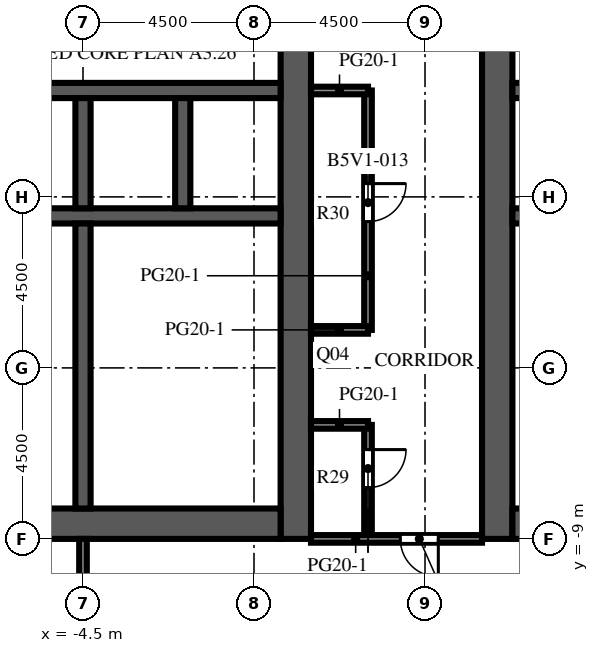
"""IFC4 building model, lengths in metres.
Left out: names, types, materials, properties, quantities, classifications, styles, units other than length and angle.
Written with IfcOpenShell. Run it as: python <this file> out.ifc"""

import sys

from ifc_helpers import new_model, si_unit, direction, frame, frame_2d, origin, place, context, subcontext, project, spatial, rectangle, extrude, element, fill, save


model = new_model("IFC4")
c1 = context("Model", 3, precision=1e-05, world=origin(), true_north=direction((0.0, 1.0)))
c2 = subcontext(c1, "Body", "Model", "MODEL_VIEW")
j1 = project(units=[si_unit("LENGTHUNIT", "METRE"), si_unit("PLANEANGLEUNIT", "RADIAN")], contexts=[c1])
p1 = place(None, origin())
s1 = spatial("IfcSite", under=j1, at=p1, CompositionType="ELEMENT")
p2 = place(p1, origin())
s2 = spatial("IfcBuilding", under=s1, at=p2, CompositionType="ELEMENT")
p3 = place(p2, frame((0.0, 0.0, 165.0)))
s3 = spatial("IfcBuildingStorey", under=s2, at=p3, CompositionType="ELEMENT", Elevation=165.0)
p4 = place(p3, frame((1.1, -9.0, 0.0), z_axis=(0.0, 0.0, 1.0), x_axis=(0.0, 1.0, 0.0)))
e1 = element("IfcWall", 1, at=p4, inside=s3, PredefinedType="SHEAR", context=c2, shape_type="SweptSolid", body=[
    extrude(rectangle(XDim=27.5, YDim=0.8, at=frame_2d((13.75, 0.0))), origin(), (0.0, 0.0, 1.0), 4.1),
])
p5 = place(p4, frame((12.55, 0.0, 0.0)))
e2 = element("IfcOpeningElement", 2, at=p5, cuts=e1, PredefinedType="OPENING", context=c2, shape_type="SweptSolid", body=[
    extrude(rectangle(XDim=2.4, YDim=2.4, at=frame_2d((1.2, 1.2))), frame((0.0, 0.41, 0.0), z_axis=(0.0, -1.0, 0.0), x_axis=(1.0, 0.0, 0.0)), (0.0, 0.0, 1.0), 0.82),
])
p6 = place(p4, frame((3.95, 0.0, 0.0)))
e3 = element("IfcOpeningElement", 3, at=p6, cuts=e1, PredefinedType="OPENING", context=c2, shape_type="SweptSolid", body=[
    extrude(rectangle(XDim=1.2, YDim=2.1, at=frame_2d((0.6, 1.05))), frame((0.0, 0.41, 0.0), z_axis=(0.0, -1.0, 0.0), x_axis=(1.0, 0.0, 0.0)), (0.0, 0.0, 1.0), 0.82),
])
p7 = place(p4, frame((22.35, 0.0, 0.0)))
e4 = element("IfcOpeningElement", 4, at=p7, cuts=e1, PredefinedType="OPENING", context=c2, shape_type="SweptSolid", body=[
    extrude(rectangle(XDim=1.2, YDim=2.1, at=frame_2d((0.6, 1.05))), frame((0.0, 0.41, 0.0), z_axis=(0.0, -1.0, 0.0), x_axis=(1.0, 0.0, 0.0)), (0.0, 0.0, 1.0), 0.82),
])
p8 = place(p3, frame((-9.7, -8.6, 0.0), z_axis=(0.0, 0.0, 1.0), x_axis=(1.0, 0.0, 0.0)))
e5 = element("IfcWall", 5, at=p8, inside=s3, PredefinedType="SHEAR", context=c2, shape_type="SweptSolid", body=[
    extrude(rectangle(XDim=10.4, YDim=0.8, at=frame_2d((5.2, 0.0))), origin(), (0.0, 0.0, 1.0), 4.1),
])
p9 = place(p3, frame((-9.7, -0.5, 0.0), z_axis=(0.0, 0.0, 1.0), x_axis=(1.0, 0.0, 0.0)))
e6 = element("IfcWall", 6, at=p9, inside=s3, PredefinedType="SHEAR", context=c2, shape_type="SweptSolid", body=[
    extrude(rectangle(XDim=10.4, YDim=0.4, at=frame_2d((5.2, 0.0))), origin(), (0.0, 0.0, 1.0), 4.1),
])
p10 = place(p3, frame((-9.7, 2.8, 0.0), z_axis=(0.0, 0.0, 1.0), x_axis=(1.0, 0.0, 0.0)))
e7 = element("IfcWall", 7, at=p10, inside=s3, PredefinedType="SHEAR", context=c2, shape_type="SweptSolid", body=[
    extrude(rectangle(XDim=10.4, YDim=0.4, at=frame_2d((5.2, 0.0))), origin(), (0.0, 0.0, 1.0), 4.1),
])
p11 = place(p10, frame((0.738, 0.0, 0.0)))
e8 = element("IfcOpeningElement", 8, at=p11, cuts=e7, PredefinedType="OPENING", context=c2, shape_type="SweptSolid", body=[
    extrude(rectangle(XDim=1.1, YDim=2.1, at=frame_2d((0.55, 1.05))), frame((0.0, 0.21, 0.0), z_axis=(0.0, -1.0, 0.0), x_axis=(1.0, 0.0, 0.0)), (0.0, 0.0, 1.0), 0.42),
])
p12 = place(p10, frame((3.337, 0.0, 0.0)))
e9 = element("IfcOpeningElement", 9, at=p12, cuts=e7, PredefinedType="OPENING", context=c2, shape_type="SweptSolid", body=[
    extrude(rectangle(XDim=1.1, YDim=2.1, at=frame_2d((0.55, 1.05))), frame((0.0, 0.21, 0.0), z_axis=(0.0, -1.0, 0.0), x_axis=(1.0, 0.0, 0.0)), (0.0, 0.0, 1.0), 0.42),
])
p13 = place(p10, frame((6.012, 0.0, 0.0)))
e10 = element("IfcOpeningElement", 10, at=p13, cuts=e7, PredefinedType="OPENING", context=c2, shape_type="SweptSolid", body=[
    extrude(rectangle(XDim=1.0, YDim=2.1, at=frame_2d((0.5, 1.05))), frame((0.0, 0.21, 0.0), z_axis=(0.0, -1.0, 0.0), x_axis=(1.0, 0.0, 0.0)), (0.0, 0.0, 1.0), 0.42),
])
p14 = place(p10, frame((8.613, 0.0, 0.0)))
e11 = element("IfcOpeningElement", 11, at=p14, cuts=e7, PredefinedType="OPENING", context=c2, shape_type="SweptSolid", body=[
    extrude(rectangle(XDim=1.0, YDim=2.1, at=frame_2d((0.5, 1.05))), frame((0.0, 0.21, 0.0), z_axis=(0.0, -1.0, 0.0), x_axis=(1.0, 0.0, 0.0)), (0.0, 0.0, 1.0), 0.42),
])
for number, where, z_axis, x_axis in (
    (12, (-4.5, -0.3, 0.0), (0.0, 0.0, 1.0), (0.0, 1.0, 0.0)),
    (13, (-1.875, -0.3, 0.0), (0.0, 0.0, 1.0), (0.0, 1.0, 0.0)),
):
    element("IfcWall", number, at=place(p3, frame(where, z_axis=z_axis, x_axis=x_axis)), inside=s3, PredefinedType="SHEAR", context=c2, shape_type="SweptSolid", body=[
        extrude(rectangle(XDim=2.9, YDim=0.4, at=frame_2d((1.45, 0.0))), origin(), (0.0, 0.0, 1.0), 4.1),
    ])
p15 = place(p3, frame((-4.5, -8.2, 0.0), z_axis=(0.0, 0.0, 1.0), x_axis=(0.0, 1.0, 0.0)))
e14 = element("IfcWall", 14, at=p15, inside=s3, PredefinedType="SHEAR", context=c2, shape_type="SweptSolid", body=[
    extrude(rectangle(XDim=7.5, YDim=0.4, at=frame_2d((3.75, 0.0))), origin(), (0.0, 0.0, 1.0), 4.1),
])
p16 = place(p3, frame((6.4, -9.0, 0.0), z_axis=(0.0, 0.0, 1.0), x_axis=(0.0, 1.0, 0.0)))
e15 = element("IfcWall", 15, at=p16, inside=s3, PredefinedType="SHEAR", context=c2, shape_type="SweptSolid", body=[
    extrude(rectangle(XDim=27.5, YDim=0.8, at=frame_2d((13.75, 0.0))), origin(), (0.0, 0.0, 1.0), 4.1),
])
p17 = place(p16, frame((12.55, 0.0, 0.0)))
e16 = element("IfcOpeningElement", 16, at=p17, cuts=e15, PredefinedType="OPENING", context=c2, shape_type="SweptSolid", body=[
    extrude(rectangle(XDim=2.4, YDim=2.4, at=frame_2d((1.2, 1.2))), frame((0.0, 0.41, 0.0), z_axis=(0.0, -1.0, 0.0), x_axis=(1.0, 0.0, 0.0)), (0.0, 0.0, 1.0), 0.82),
])
p18 = place(p16, frame((3.95, 0.0, 0.0)))
e17 = element("IfcOpeningElement", 17, at=p18, cuts=e15, PredefinedType="OPENING", context=c2, shape_type="SweptSolid", body=[
    extrude(rectangle(XDim=1.2, YDim=2.1, at=frame_2d((0.6, 1.05))), frame((0.0, 0.41, 0.0), z_axis=(0.0, -1.0, 0.0), x_axis=(1.0, 0.0, 0.0)), (0.0, 0.0, 1.0), 0.82),
])
p19 = place(p16, frame((22.35, 0.0, 0.0)))
e18 = element("IfcOpeningElement", 18, at=p19, cuts=e15, PredefinedType="OPENING", context=c2, shape_type="SweptSolid", body=[
    extrude(rectangle(XDim=1.2, YDim=2.1, at=frame_2d((0.6, 1.05))), frame((0.0, 0.41, 0.0), z_axis=(0.0, -1.0, 0.0), x_axis=(1.0, 0.0, 0.0)), (0.0, 0.0, 1.0), 0.82),
])
p20 = place(p3, frame((6.8, -8.6, 0.0), z_axis=(0.0, 0.0, 1.0), x_axis=(1.0, 0.0, 0.0)))
e19 = element("IfcWall", 19, at=p20, inside=s3, PredefinedType="SHEAR", context=c2, shape_type="SweptSolid", body=[
    extrude(rectangle(XDim=10.4, YDim=0.8, at=frame_2d((5.2, 0.0))), origin(), (0.0, 0.0, 1.0), 4.1),
])
p21 = place(p3, frame((6.8, -0.5, 0.0), z_axis=(0.0, 0.0, 1.0), x_axis=(1.0, 0.0, 0.0)))
e20 = element("IfcWall", 20, at=p21, inside=s3, PredefinedType="SHEAR", context=c2, shape_type="SweptSolid", body=[
    extrude(rectangle(XDim=10.4, YDim=0.4, at=frame_2d((5.2, 0.0))), origin(), (0.0, 0.0, 1.0), 4.1),
])
p22 = place(p3, frame((6.8, 2.8, 0.0), z_axis=(0.0, 0.0, 1.0), x_axis=(1.0, 0.0, 0.0)))
e21 = element("IfcWall", 21, at=p22, inside=s3, PredefinedType="SHEAR", context=c2, shape_type="SweptSolid", body=[
    extrude(rectangle(XDim=10.4, YDim=0.4, at=frame_2d((5.2, 0.0))), origin(), (0.0, 0.0, 1.0), 4.1),
])
p23 = place(p22, frame((0.738, 0.0, 0.0)))
e22 = element("IfcOpeningElement", 22, at=p23, cuts=e21, PredefinedType="OPENING", context=c2, shape_type="SweptSolid", body=[
    extrude(rectangle(XDim=1.1, YDim=2.1, at=frame_2d((0.55, 1.05))), frame((0.0, 0.21, 0.0), z_axis=(0.0, -1.0, 0.0), x_axis=(1.0, 0.0, 0.0)), (0.0, 0.0, 1.0), 0.42),
])
p24 = place(p22, frame((3.337, 0.0, 0.0)))
e23 = element("IfcOpeningElement", 23, at=p24, cuts=e21, PredefinedType="OPENING", context=c2, shape_type="SweptSolid", body=[
    extrude(rectangle(XDim=1.1, YDim=2.1, at=frame_2d((0.55, 1.05))), frame((0.0, 0.21, 0.0), z_axis=(0.0, -1.0, 0.0), x_axis=(1.0, 0.0, 0.0)), (0.0, 0.0, 1.0), 0.42),
])
p25 = place(p22, frame((6.012, 0.0, 0.0)))
e24 = element("IfcOpeningElement", 24, at=p25, cuts=e21, PredefinedType="OPENING", context=c2, shape_type="SweptSolid", body=[
    extrude(rectangle(XDim=1.0, YDim=2.1, at=frame_2d((0.5, 1.05))), frame((0.0, 0.21, 0.0), z_axis=(0.0, -1.0, 0.0), x_axis=(1.0, 0.0, 0.0)), (0.0, 0.0, 1.0), 0.42),
])
p26 = place(p22, frame((8.613, 0.0, 0.0)))
e25 = element("IfcOpeningElement", 25, at=p26, cuts=e21, PredefinedType="OPENING", context=c2, shape_type="SweptSolid", body=[
    extrude(rectangle(XDim=1.0, YDim=2.1, at=frame_2d((0.5, 1.05))), frame((0.0, 0.21, 0.0), z_axis=(0.0, -1.0, 0.0), x_axis=(1.0, 0.0, 0.0)), (0.0, 0.0, 1.0), 0.42),
])
p27 = place(p3, frame((-0.8, -8.2, 0.0), z_axis=(0.0, 0.0, 1.0), x_axis=(0.0, 1.0, 0.0)))
e26 = element("IfcWall", 26, at=p27, inside=s3, PredefinedType="PARTITIONING", context=c2, shape_type="SweptSolid", body=[
    extrude(rectangle(XDim=2.55, YDim=0.1, at=frame_2d((1.275, 0.0))), origin(), (0.0, 0.0, 1.0), 3.65),
])
p28 = place(p27, frame((0.775, 0.0, 0.0)))
e27 = element("IfcOpeningElement", 27, at=p28, cuts=e26, PredefinedType="OPENING", context=c2, shape_type="SweptSolid", body=[
    extrude(rectangle(XDim=1.0, YDim=2.1, at=frame_2d((0.5, 1.05))), frame((0.0, 0.06, 0.0), z_axis=(0.0, -1.0, 0.0), x_axis=(1.0, 0.0, 0.0)), (0.0, 0.0, 1.0), 0.12),
])
p29 = place(p3, frame((-0.8, -5.65, 0.0), z_axis=(0.0, 0.0, 1.0), x_axis=(0.0, 1.0, 0.0)))
e28 = element("IfcWall", 28, at=p29, inside=s3, PredefinedType="PARTITIONING", context=c2, shape_type="SweptSolid", body=[
    extrude(rectangle(XDim=2.1, YDim=0.1, at=frame_2d((1.05, 0.0))), origin(), (0.0, 0.0, 1.0), 3.65),
])
p30 = place(p29, frame((0.55, 0.0, 0.0)))
e29 = element("IfcOpeningElement", 29, at=p30, cuts=e28, PredefinedType="OPENING", context=c2, shape_type="SweptSolid", body=[
    extrude(rectangle(XDim=1.0, YDim=2.1, at=frame_2d((0.5, 1.05))), frame((0.0, 0.06, 0.0), z_axis=(0.0, -1.0, 0.0), x_axis=(1.0, 0.0, 0.0)), (0.0, 0.0, 1.0), 0.12),
])
p31 = place(p3, frame((-0.8, -3.55, 0.0), z_axis=(0.0, 0.0, 1.0), x_axis=(0.0, 1.0, 0.0)))
e30 = element("IfcWall", 30, at=p31, inside=s3, PredefinedType="PARTITIONING", context=c2, shape_type="SweptSolid", body=[
    extrude(rectangle(XDim=2.85, YDim=0.1, at=frame_2d((1.425, 0.0))), origin(), (0.0, 0.0, 1.0), 3.65),
])
p32 = place(p31, frame((0.925, 0.0, 0.0)))
e31 = element("IfcOpeningElement", 31, at=p32, cuts=e30, PredefinedType="OPENING", context=c2, shape_type="SweptSolid", body=[
    extrude(rectangle(XDim=1.0, YDim=2.1, at=frame_2d((0.5, 1.05))), frame((0.0, 0.06, 0.0), z_axis=(0.0, -1.0, 0.0), x_axis=(1.0, 0.0, 0.0)), (0.0, 0.0, 1.0), 0.12),
])
for number, where, z_axis, x_axis in (
    (32, (-4.3, -5.65, 0.0), (0.0, 0.0, 1.0), (1.0, 0.0, 0.0)),
    (33, (-4.3, -3.55, 0.0), (0.0, 0.0, 1.0), (1.0, 0.0, 0.0)),
):
    element("IfcWall", number, at=place(p3, frame(where, z_axis=z_axis, x_axis=x_axis)), inside=s3, PredefinedType="PARTITIONING", context=c2, shape_type="SweptSolid", body=[
        extrude(rectangle(XDim=3.5, YDim=0.1, at=frame_2d((1.75, 0.0))), origin(), (0.0, 0.0, 1.0), 3.65),
    ])
p33 = place(p3, frame((-4.5, -26.5, 0.0), z_axis=(0.0, 0.0, 1.0), x_axis=(0.0, 1.0, 0.0)))
e34 = element("IfcWall", 34, at=p33, inside=s3, PredefinedType="PARTITIONING", context=c2, shape_type="SweptSolid", body=[
    extrude(rectangle(XDim=17.5, YDim=0.2, at=frame_2d((8.75, 0.0))), origin(), (0.0, 0.0, 1.0), 3.65),
])
p34 = place(p3, frame((3.0, -9.0, 0.0), z_axis=(0.0, 0.0, 1.0), x_axis=(0.0, 1.0, 0.0)))
e35 = element("IfcWall", 35, at=p34, inside=s3, PredefinedType="PARTITIONING", context=c2, shape_type="SweptSolid", body=[
    extrude(rectangle(XDim=3.0, YDim=0.2, at=frame_2d((1.5, 0.0))), origin(), (0.0, 0.0, 1.0), 3.65),
])
p35 = place(p34, frame((1.35, 0.0, 0.0)))
e36 = element("IfcOpeningElement", 36, at=p35, cuts=e35, PredefinedType="OPENING", context=c2, shape_type="SweptSolid", body=[
    extrude(rectangle(XDim=1.0, YDim=2.1, at=frame_2d((0.5, 1.05))), frame((0.0, 0.11, 0.0), z_axis=(0.0, -1.0, 0.0), x_axis=(1.0, 0.0, 0.0)), (0.0, 0.0, 1.0), 0.22),
])
p36 = place(p3, frame((3.0, -3.5, 0.0), z_axis=(0.0, 0.0, 1.0), x_axis=(0.0, 1.0, 0.0)))
e37 = element("IfcWall", 37, at=p36, inside=s3, PredefinedType="PARTITIONING", context=c2, shape_type="SweptSolid", body=[
    extrude(rectangle(XDim=6.3, YDim=0.2, at=frame_2d((3.15, 0.0))), origin(), (0.0, 0.0, 1.0), 3.65),
])
p37 = place(p36, frame((2.85, 0.0, 0.0)))
e38 = element("IfcOpeningElement", 38, at=p37, cuts=e37, PredefinedType="OPENING", context=c2, shape_type="SweptSolid", body=[
    extrude(rectangle(XDim=1.0, YDim=2.1, at=frame_2d((0.5, 1.05))), frame((0.0, 0.11, 0.0), z_axis=(0.0, -1.0, 0.0), x_axis=(1.0, 0.0, 0.0)), (0.0, 0.0, 1.0), 0.22),
])
p38 = place(p3, frame((6.0, -9.0, 0.0), z_axis=(0.0, 0.0, 1.0), x_axis=(-1.0, 0.0, 0.0)))
e39 = element("IfcWall", 39, at=p38, inside=s3, PredefinedType="PARTITIONING", context=c2, shape_type="SweptSolid", body=[
    extrude(rectangle(XDim=4.5, YDim=0.2, at=frame_2d((2.25, 0.0))), origin(), (0.0, 0.0, 1.0), 3.65),
])
p39 = place(p38, frame((1.15, 0.0, 0.0)))
e40 = element("IfcOpeningElement", 40, at=p39, cuts=e39, PredefinedType="OPENING", context=c2, shape_type="SweptSolid", body=[
    extrude(rectangle(XDim=1.0, YDim=2.1, at=frame_2d((0.5, 1.05))), frame((0.0, 0.11, 0.0), z_axis=(0.0, -1.0, 0.0), x_axis=(1.0, 0.0, 0.0)), (0.0, 0.0, 1.0), 0.22),
])
for number, where, z_axis, x_axis in (
    (41, (1.5, -6.0, 0.0), (0.0, 0.0, 1.0), (1.0, 0.0, 0.0)),
    (42, (1.5, -3.5, 0.0), (0.0, 0.0, 1.0), (1.0, 0.0, 0.0)),
    (43, (1.5, 2.8, 0.0), (0.0, 0.0, 1.0), (1.0, 0.0, 0.0)),
):
    element("IfcWall", number, at=place(p3, frame(where, z_axis=z_axis, x_axis=x_axis)), inside=s3, PredefinedType="PARTITIONING", context=c2, shape_type="SweptSolid", body=[
        extrude(rectangle(XDim=1.5, YDim=0.2, at=frame_2d((0.75, 0.0))), origin(), (0.0, 0.0, 1.0), 3.65),
    ])
p40 = place(p12, origin())
e44 = element("IfcDoor", 44, at=p40, inside=s3, OperationType="DOUBLE_DOOR_SLIDING", PredefinedType="DOOR", context=c2, shape_type="SweptSolid", body=[
    extrude(rectangle(XDim=1.1, YDim=2.1, at=frame_2d((0.55, 1.05))), frame((0.0, 0.025, 0.0), z_axis=(0.0, -1.0, 0.0), x_axis=(1.0, 0.0, 0.0)), (0.0, 0.0, 1.0), 0.05),
])
fill(e9, e44)
p41 = place(p5, origin())
e45 = element("IfcDoor", 45, at=p41, inside=s3, OperationType="DOUBLE_DOOR_DOUBLE_SWING", PredefinedType="DOOR", context=c2, shape_type="SweptSolid", body=[
    extrude(rectangle(XDim=2.4, YDim=2.4, at=frame_2d((1.2, 1.2))), frame((0.0, 0.025, 0.0), z_axis=(0.0, -1.0, 0.0), x_axis=(1.0, 0.0, 0.0)), (0.0, 0.0, 1.0), 0.05),
])
fill(e2, e45)
p42 = place(p17, origin())
e46 = element("IfcDoor", 46, at=p42, inside=s3, OperationType="DOUBLE_DOOR_DOUBLE_SWING", PredefinedType="DOOR", context=c2, shape_type="SweptSolid", body=[
    extrude(rectangle(XDim=2.4, YDim=2.4, at=frame_2d((1.2, 1.2))), frame((0.0, 0.025, 0.0), z_axis=(0.0, -1.0, 0.0), x_axis=(1.0, 0.0, 0.0)), (0.0, 0.0, 1.0), 0.05),
])
fill(e16, e46)
p43 = place(p13, origin())
e47 = element("IfcDoor", 47, at=p43, inside=s3, OperationType="SINGLE_SWING_LEFT", PredefinedType="DOOR", context=c2, shape_type="SweptSolid", body=[
    extrude(rectangle(XDim=1.0, YDim=2.1, at=frame_2d((0.5, 1.05))), frame((0.0, 0.025, 0.0), z_axis=(0.0, -1.0, 0.0), x_axis=(1.0, 0.0, 0.0)), (0.0, 0.0, 1.0), 0.05),
])
fill(e10, e47)
p44 = place(p14, origin())
e48 = element("IfcDoor", 48, at=p44, inside=s3, OperationType="SINGLE_SWING_RIGHT", PredefinedType="DOOR", context=c2, shape_type="SweptSolid", body=[
    extrude(rectangle(XDim=1.0, YDim=2.1, at=frame_2d((0.5, 1.05))), frame((0.0, 0.025, 0.0), z_axis=(0.0, -1.0, 0.0), x_axis=(1.0, 0.0, 0.0)), (0.0, 0.0, 1.0), 0.05),
])
fill(e11, e48)
p45 = place(p6, origin())
e49 = element("IfcDoor", 49, at=p45, inside=s3, OperationType="SINGLE_SWING_LEFT", PredefinedType="DOOR", context=c2, shape_type="SweptSolid", body=[
    extrude(rectangle(XDim=1.2, YDim=2.1, at=frame_2d((0.6, 1.05))), frame((0.0, 0.375, 0.0), z_axis=(0.0, -1.0, 0.0), x_axis=(1.0, 0.0, 0.0)), (0.0, 0.0, 1.0), 0.05),
])
fill(e3, e49)
p46 = place(p28, origin())
e50 = element("IfcDoor", 50, at=p46, inside=s3, OperationType="SINGLE_SWING_RIGHT", PredefinedType="DOOR", context=c2, shape_type="SweptSolid", body=[
    extrude(rectangle(XDim=1.0, YDim=2.1, at=frame_2d((0.5, 1.05))), frame((0.0, 0.025, 0.0), z_axis=(0.0, -1.0, 0.0), x_axis=(1.0, 0.0, 0.0)), (0.0, 0.0, 1.0), 0.05),
])
fill(e27, e50)
p47 = place(p30, origin())
e51 = element("IfcDoor", 51, at=p47, inside=s3, OperationType="SINGLE_SWING_LEFT", PredefinedType="DOOR", context=c2, shape_type="SweptSolid", body=[
    extrude(rectangle(XDim=1.0, YDim=2.1, at=frame_2d((0.5, 1.05))), frame((0.0, 0.025, 0.0), z_axis=(0.0, -1.0, 0.0), x_axis=(1.0, 0.0, 0.0)), (0.0, 0.0, 1.0), 0.05),
])
fill(e29, e51)
p48 = place(p32, origin())
e52 = element("IfcDoor", 52, at=p48, inside=s3, OperationType="SINGLE_SWING_RIGHT", PredefinedType="DOOR", context=c2, shape_type="SweptSolid", body=[
    extrude(rectangle(XDim=1.0, YDim=2.1, at=frame_2d((0.5, 1.05))), frame((0.0, 0.025, 0.0), z_axis=(0.0, -1.0, 0.0), x_axis=(1.0, 0.0, 0.0)), (0.0, 0.0, 1.0), 0.05),
])
fill(e31, e52)
p49 = place(p18, origin())
e53 = element("IfcDoor", 53, at=p49, inside=s3, OperationType="SINGLE_SWING_RIGHT", PredefinedType="DOOR", context=c2, shape_type="SweptSolid", body=[
    extrude(rectangle(XDim=1.2, YDim=2.1, at=frame_2d((0.6, 1.05))), frame((0.0, -0.325, 0.0), z_axis=(0.0, -1.0, 0.0), x_axis=(1.0, 0.0, 0.0)), (0.0, 0.0, 1.0), 0.05),
])
fill(e17, e53)
p50 = place(p39, origin())
e54 = element("IfcDoor", 54, at=p50, inside=s3, OperationType="SINGLE_SWING_LEFT", PredefinedType="DOOR", context=c2, shape_type="SweptSolid", body=[
    extrude(rectangle(XDim=1.0, YDim=2.1, at=frame_2d((0.5, 1.05))), frame((0.0, 0.025, 0.0), z_axis=(0.0, -1.0, 0.0), x_axis=(1.0, 0.0, 0.0)), (0.0, 0.0, 1.0), 0.05),
])
fill(e40, e54)
p51 = place(p35, origin())
e55 = element("IfcDoor", 55, at=p51, inside=s3, OperationType="SINGLE_SWING_RIGHT", PredefinedType="DOOR", context=c2, shape_type="SweptSolid", body=[
    extrude(rectangle(XDim=1.0, YDim=2.1, at=frame_2d((0.5, 1.05))), frame((0.0, 0.025, 0.0), z_axis=(0.0, -1.0, 0.0), x_axis=(1.0, 0.0, 0.0)), (0.0, 0.0, 1.0), 0.05),
])
fill(e36, e55)
p52 = place(p37, origin())
e56 = element("IfcDoor", 56, at=p52, inside=s3, OperationType="SINGLE_SWING_RIGHT", PredefinedType="DOOR", context=c2, shape_type="SweptSolid", body=[
    extrude(rectangle(XDim=1.0, YDim=2.1, at=frame_2d((0.5, 1.05))), frame((0.0, 0.025, 0.0), z_axis=(0.0, -1.0, 0.0), x_axis=(1.0, 0.0, 0.0)), (0.0, 0.0, 1.0), 0.05),
])
fill(e38, e56)
save(model, sys.argv[1])
